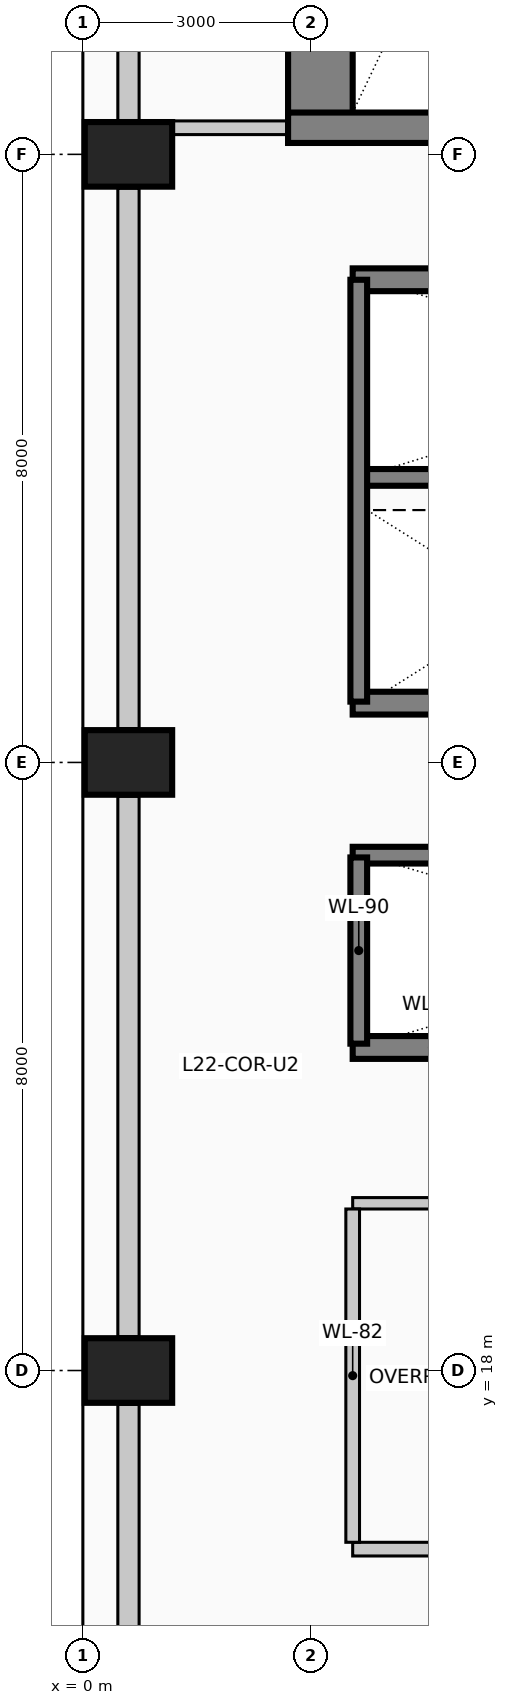
"""IFC4 building model, lengths in metres.
Left out: names, types, materials, properties, quantities, classifications, styles, units other than length and angle.
Written with IfcOpenShell. Run it as: python <this file> out.ifc"""

import sys

from ifc_helpers import new_model, si_unit, direction, frame, frame_2d, origin, origin_2d, place, context, subcontext, project, spatial, rectangle, extrude, element, save


model = new_model("IFC4")
c1 = context("Model", 3, precision=1e-05, world=origin(), true_north=direction((0.0, 1.0)))
c2 = subcontext(c1, "Body", "Model", "MODEL_VIEW")
j1 = project(units=[si_unit("LENGTHUNIT", "METRE"), si_unit("PLANEANGLEUNIT", "RADIAN")], contexts=[c1])
p1 = place(None, origin())
s1 = spatial("IfcSite", under=j1, at=p1, CompositionType="ELEMENT")
p2 = place(p1, origin())
s2 = spatial("IfcBuilding", under=s1, at=p2, CompositionType="ELEMENT")
p3 = place(p2, frame((0.0, 0.0, 92.6)))
s3 = spatial("IfcBuildingStorey", under=s2, at=p3, CompositionType="ELEMENT", Elevation=92.6)
p4 = place(p3, frame((3.125, 34.15, 0.0), z_axis=(0.0, 0.0, 1.0), x_axis=(0.0, 1.0, 0.0)))
e1 = element("IfcWall", 1, at=p4, inside=s3, PredefinedType="SHEAR", context=c2, shape_type="SweptSolid", body=[
    extrude(rectangle(XDim=9.13, YDim=0.85, at=frame_2d((4.565, 0.0))), origin(), (0.0, 0.0, 1.0), 4.0),
])
p5 = place(p3, frame((2.7, 34.35, 0.0), z_axis=(0.0, 0.0, 1.0), x_axis=(1.0, 0.0, 0.0)))
e2 = element("IfcWall", 2, at=p5, inside=s3, PredefinedType="SHEAR", context=c2, shape_type="SweptSolid", body=[
    extrude(rectangle(XDim=5.01, YDim=0.4, at=frame_2d((2.505, 0.0))), origin(), (0.0, 0.0, 1.0), 4.0),
])
p6 = place(p5, frame((2.4, 0.0, 0.0)))
e3 = element("IfcOpeningElement", 3, at=p6, cuts=e2, PredefinedType="OPENING", context=c2, shape_type="SweptSolid", body=[
    extrude(rectangle(XDim=1.15, YDim=2.2, at=frame_2d((0.575, 1.1))), frame((0.0, 0.21, 0.0), z_axis=(0.0, -1.0, 0.0), x_axis=(1.0, 0.0, 0.0)), (0.0, 0.0, 1.0), 0.42),
])
for number, where, z_axis, x_axis in (
    (4, (0.6, 18.0, 0.0), (0.0, 0.0, 1.0), (0.0, 1.0, 0.0)),
    (5, (0.6, 26.0, 0.0), (0.0, 0.0, 1.0), (0.0, 1.0, 0.0)),
    (6, (0.6, 34.0, 0.0), (0.0, 0.0, 1.0), (0.0, 1.0, 0.0)),
):
    element("IfcColumn", number, at=place(p3, frame(where, z_axis=z_axis, x_axis=x_axis)), inside=s3, PredefinedType="COLUMN", context=c2, shape_type="SweptSolid", body=[
        extrude(rectangle(XDim=0.85, YDim=1.15, at=origin_2d()), origin(), (0.0, 0.0, 1.0), 4.0),
    ])
for number, where, z_axis, x_axis in (
    (7, (0.6, 10.445, 0.0), (0.0, 0.0, 1.0), (0.0, 1.0, 0.0)),
    (8, (0.6, 18.445, 0.0), (0.0, 0.0, 1.0), (0.0, 1.0, 0.0)),
    (9, (0.6, 26.445, 0.0), (0.0, 0.0, 1.0), (0.0, 1.0, 0.0)),
):
    element("IfcWall", number, at=place(p3, frame(where, z_axis=z_axis, x_axis=x_axis)), inside=s3, PredefinedType="SOLIDWALL", context=c2, shape_type="SweptSolid", body=[
        extrude(rectangle(XDim=7.11, YDim=0.28, at=frame_2d((3.555, 0.0))), origin(), (0.0, 0.0, 1.0), 2.875),
    ])
p7 = place(p3, frame((0.6, 34.445, 0.0), z_axis=(0.0, 0.0, 1.0), x_axis=(0.0, 1.0, 0.0)))
e10 = element("IfcWall", 10, at=p7, inside=s3, PredefinedType="SOLIDWALL", context=c2, shape_type="SweptSolid", body=[
    extrude(rectangle(XDim=7.51, YDim=0.28, at=frame_2d((3.755, 0.0))), origin(), (0.0, 0.0, 1.0), 2.875),
])
for number, where, z_axis, x_axis in (
    (11, (5.65, 22.25, 0.0), (0.0, 0.0, 1.0), (-1.0, 0.0, 0.0)),
    (12, (3.55, 32.35, 0.0), (0.0, 0.0, 1.0), (1.0, 0.0, 0.0)),
    (13, (5.65, 26.78, 0.0), (0.0, 0.0, 1.0), (-1.0, 0.0, 0.0)),
):
    element("IfcWall", number, at=place(p3, frame(where, z_axis=z_axis, x_axis=x_axis)), inside=s3, PredefinedType="SOLIDWALL", context=c2, shape_type="SweptSolid", body=[
        extrude(rectangle(XDim=2.1, YDim=0.3, at=frame_2d((1.05, 0.0))), origin(), (0.0, 0.0, 1.0), 4.0),
    ])
p8 = place(p3, frame((3.55, 29.75, 0.0), z_axis=(0.0, 0.0, 1.0), x_axis=(1.0, 0.0, 0.0)))
e14 = element("IfcWall", 14, at=p8, inside=s3, PredefinedType="SOLIDWALL", context=c2, shape_type="SweptSolid", body=[
    extrude(rectangle(XDim=8.65, YDim=0.22, at=frame_2d((4.325, 0.0))), origin(), (0.0, 0.0, 1.0), 4.0),
])
p9 = place(p3, frame((3.63, 26.8, 0.0), z_axis=(0.0, 0.0, 1.0), x_axis=(0.0, 1.0, 0.0)))
e15 = element("IfcWall", 15, at=p9, inside=s3, PredefinedType="SOLIDWALL", context=c2, shape_type="SweptSolid", body=[
    extrude(rectangle(XDim=5.55, YDim=0.22, at=frame_2d((2.775, 0.0))), origin(), (0.0, 0.0, 1.0), 4.0),
])
p10 = place(p3, frame((3.55, 24.78, 0.0), z_axis=(0.0, 0.0, 1.0), x_axis=(1.0, 0.0, 0.0)))
e16 = element("IfcWall", 16, at=p10, inside=s3, PredefinedType="SOLIDWALL", context=c2, shape_type="SweptSolid", body=[
    extrude(rectangle(XDim=8.65, YDim=0.22, at=frame_2d((4.325, 0.0))), origin(), (0.0, 0.0, 1.0), 4.0),
])
p11 = place(p3, frame((3.63, 22.3, 0.0), z_axis=(0.0, 0.0, 1.0), x_axis=(0.0, 1.0, 0.0)))
e17 = element("IfcWall", 17, at=p11, inside=s3, PredefinedType="SOLIDWALL", context=c2, shape_type="SweptSolid", body=[
    extrude(rectangle(XDim=2.45, YDim=0.22, at=frame_2d((1.225, 0.0))), origin(), (0.0, 0.0, 1.0), 4.0),
])
p12 = place(p3, frame((3.55, 15.65, 0.0), z_axis=(0.0, 0.0, 1.0), x_axis=(1.0, 0.0, 0.0)))
e18 = element("IfcWall", 18, at=p12, inside=s3, PredefinedType="PARTITIONING", context=c2, shape_type="SweptSolid", body=[
    extrude(rectangle(XDim=12.3, YDim=0.18, at=frame_2d((6.15, 0.0))), origin(), (0.0, 0.0, 1.0), 3.725),
])
p13 = place(p12, frame((5.675, 0.0, 0.0)))
e19 = element("IfcOpeningElement", 19, at=p13, cuts=e18, PredefinedType="OPENING", context=c2, shape_type="SweptSolid", body=[
    extrude(rectangle(XDim=0.95, YDim=2.15, at=frame_2d((0.475, 1.075))), frame((0.0, 0.1, 0.0), z_axis=(0.0, -1.0, 0.0), x_axis=(1.0, 0.0, 0.0)), (0.0, 0.0, 1.0), 0.2),
])
p14 = place(p3, frame((3.55, 20.2, 0.0), z_axis=(0.0, 0.0, 1.0), x_axis=(1.0, 0.0, 0.0)))
e20 = element("IfcWall", 20, at=p14, inside=s3, PredefinedType="PARTITIONING", context=c2, shape_type="SweptSolid", body=[
    extrude(rectangle(XDim=8.65, YDim=0.15, at=frame_2d((4.325, 0.0))), origin(), (0.0, 0.0, 1.0), 3.725),
])
p15 = place(p3, frame((1.175, 34.35, 0.0), z_axis=(0.0, 0.0, 1.0), x_axis=(1.0, 0.0, 0.0)))
e21 = element("IfcWall", 21, at=p15, inside=s3, PredefinedType="PARTITIONING", context=c2, shape_type="SweptSolid", body=[
    extrude(rectangle(XDim=1.525, YDim=0.18, at=frame_2d((0.762, 0.0))), origin(), (0.0, 0.0, 1.0), 3.725),
])
p16 = place(p3, frame((3.55, 15.74, 0.0), z_axis=(0.0, 0.0, 1.0), x_axis=(0.0, 1.0, 0.0)))
e22 = element("IfcWall", 22, at=p16, inside=s3, PredefinedType="PARTITIONING", context=c2, shape_type="SweptSolid", body=[
    extrude(rectangle(XDim=4.385, YDim=0.18, at=frame_2d((2.192, 0.0))), origin(), (0.0, 0.0, 1.0), 3.725),
])
save(model, sys.argv[1])
